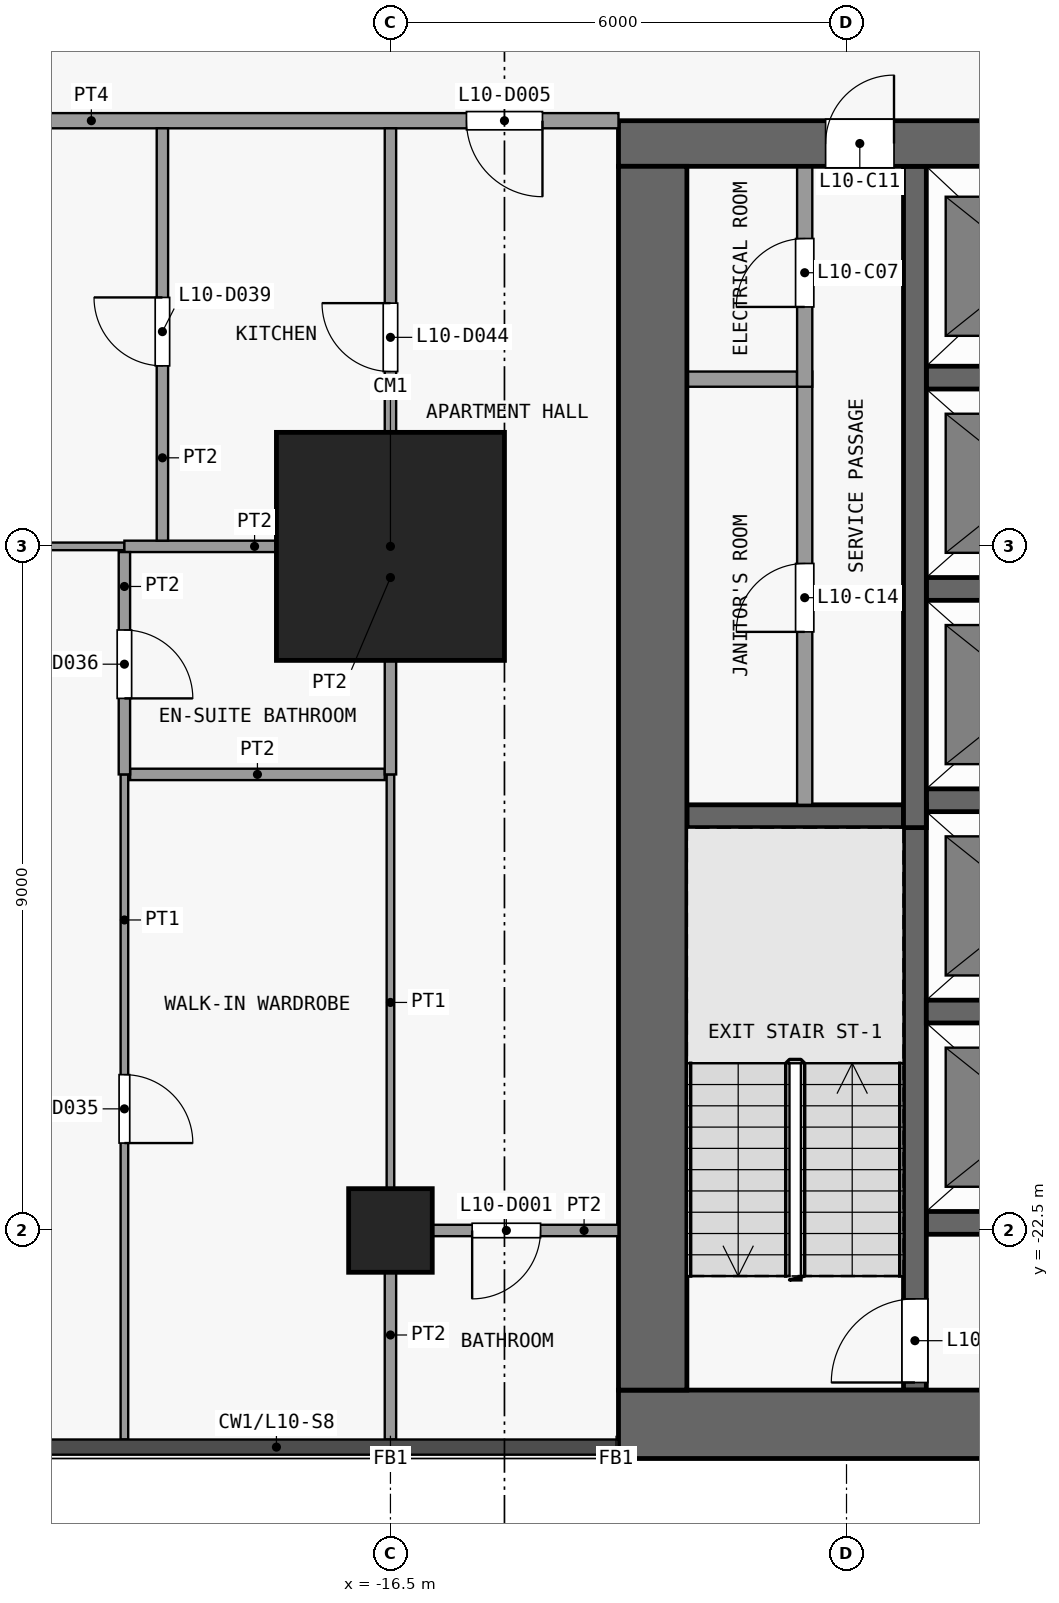
"""IFC4 building model, lengths in metres.
Left out: names, types, materials, properties, quantities, classifications, styles, units other than length and angle.
Written with IfcOpenShell. Run it as: python <this file> out.ifc"""

import sys

from ifc_helpers import new_model, si_unit, direction, frame, frame_2d, origin, origin_2d, place, context, subcontext, project, spatial, rectangle, extrude, element, fill, save


model = new_model("IFC4")
c1 = context("Model", 3, precision=1e-05, world=origin(), true_north=direction((0.0, 1.0)))
c2 = subcontext(c1, "Body", "Model", "MODEL_VIEW")
j1 = project(units=[si_unit("LENGTHUNIT", "METRE"), si_unit("PLANEANGLEUNIT", "RADIAN")], contexts=[c1])
p1 = place(None, origin())
s1 = spatial("IfcSite", under=j1, at=p1, CompositionType="ELEMENT")
p2 = place(p1, origin())
s2 = spatial("IfcBuilding", under=s1, at=p2, CompositionType="ELEMENT")
p3 = place(p2, frame((0.0, 0.0, 46.9)))
s3 = spatial("IfcBuildingStorey", under=s2, at=p3, CompositionType="ELEMENT", Elevation=46.9)
p4 = place(p3, frame((-16.5, -22.5, 0.0), z_axis=(0.0, 0.0, 1.0), x_axis=(1.0, 0.0, 0.0)))
e1 = element("IfcColumn", 1, at=p4, inside=s3, PredefinedType="COLUMN", context=c2, shape_type="SweptSolid", body=[
    extrude(rectangle(XDim=1.1, YDim=1.1, at=origin_2d()), origin(), (0.0, 0.0, 1.0), 3.6),
])
p5 = place(p3, frame((-16.5, -13.5, 0.0), z_axis=(0.0, 0.0, 1.0), x_axis=(1.0, 0.0, 0.0)))
e2 = element("IfcColumn", 2, at=p5, inside=s3, PredefinedType="COLUMN", context=c2, shape_type="SweptSolid", body=[
    extrude(rectangle(XDim=3.0, YDim=3.0, at=origin_2d()), origin(), (0.0, 0.0, 1.0), 3.6),
])
p6 = place(p3, frame((-13.5, -25.05, 0.0), z_axis=(0.0, 0.0, 1.0), x_axis=(1.0, 0.0, 0.0)))
e3 = element("IfcWall", 3, at=p6, inside=s3, PredefinedType="SHEAR", context=c2, shape_type="SweptSolid", body=[
    extrude(rectangle(XDim=27.0, YDim=0.9, at=frame_2d((13.5, 0.0))), origin(), (0.0, 0.0, 1.0), 3.3),
])
p7 = place(p3, frame((-13.5, -8.2, 0.0), z_axis=(0.0, 0.0, 1.0), x_axis=(1.0, 0.0, 0.0)))
e4 = element("IfcWall", 4, at=p7, inside=s3, PredefinedType="SHEAR", context=c2, shape_type="SweptSolid", body=[
    extrude(rectangle(XDim=27.0, YDim=0.6, at=frame_2d((13.5, 0.0))), origin(), (0.0, 0.0, 1.0), 3.3),
])
p8 = place(p7, frame((7.8, 0.0, 0.0)))
e5 = element("IfcOpeningElement", 5, at=p8, cuts=e4, PredefinedType="OPENING", context=c2, shape_type="SweptSolid", body=[
    extrude(rectangle(XDim=1.8, YDim=2.1, at=frame_2d((0.9, 1.05))), frame((0.0, 0.31, 0.0), z_axis=(0.0, -1.0, 0.0), x_axis=(1.0, 0.0, 0.0)), (0.0, 0.0, 1.0), 0.62),
])
p9 = place(p7, frame((17.4, 0.0, 0.0)))
e6 = element("IfcOpeningElement", 6, at=p9, cuts=e4, PredefinedType="OPENING", context=c2, shape_type="SweptSolid", body=[
    extrude(rectangle(XDim=1.8, YDim=2.1, at=frame_2d((0.9, 1.05))), frame((0.0, 0.31, 0.0), z_axis=(0.0, -1.0, 0.0), x_axis=(1.0, 0.0, 0.0)), (0.0, 0.0, 1.0), 0.62),
])
p10 = place(p7, frame((2.725, 0.0, 0.0)))
e7 = element("IfcOpeningElement", 7, at=p10, cuts=e4, PredefinedType="OPENING", context=c2, shape_type="SweptSolid", body=[
    extrude(rectangle(XDim=0.9, YDim=2.1, at=frame_2d((0.45, 1.05))), frame((0.0, 0.31, 0.0), z_axis=(0.0, -1.0, 0.0), x_axis=(1.0, 0.0, 0.0)), (0.0, 0.0, 1.0), 0.62),
])
p11 = place(p7, frame((23.375, 0.0, 0.0)))
e8 = element("IfcOpeningElement", 8, at=p11, cuts=e4, PredefinedType="OPENING", context=c2, shape_type="SweptSolid", body=[
    extrude(rectangle(XDim=0.9, YDim=2.1, at=frame_2d((0.45, 1.05))), frame((0.0, 0.31, 0.0), z_axis=(0.0, -1.0, 0.0), x_axis=(1.0, 0.0, 0.0)), (0.0, 0.0, 1.0), 0.62),
])
p12 = place(p3, frame((-13.05, -24.6, 0.0), z_axis=(0.0, 0.0, 1.0), x_axis=(0.0, 1.0, 0.0)))
e9 = element("IfcWall", 9, at=p12, inside=s3, PredefinedType="SHEAR", context=c2, shape_type="SweptSolid", body=[
    extrude(rectangle(XDim=16.1, YDim=0.9, at=frame_2d((8.05, 0.0))), origin(), (0.0, 0.0, 1.0), 3.3),
])
for number, where, z_axis, x_axis in (
    (10, (-9.45, -22.4, 0.0), (0.0, 0.0, 1.0), (1.0, 0.0, 0.0)),
    (11, (-9.45, -19.62, 0.0), (0.0, 0.0, 1.0), (1.0, 0.0, 0.0)),
):
    element("IfcWall", number, at=place(p3, frame(where, z_axis=z_axis, x_axis=x_axis)), inside=s3, PredefinedType="SHEAR", context=c2, shape_type="SweptSolid", body=[
        extrude(rectangle(XDim=2.8, YDim=0.3, at=frame_2d((1.4, 0.0))), origin(), (0.0, 0.0, 1.0), 3.3),
    ])
p13 = place(p3, frame((-12.6, -17.05, 0.0), z_axis=(0.0, 0.0, 1.0), x_axis=(1.0, 0.0, 0.0)))
e12 = element("IfcWall", 12, at=p13, inside=s3, PredefinedType="SHEAR", context=c2, shape_type="SweptSolid", body=[
    extrude(rectangle(XDim=2.85, YDim=0.3, at=frame_2d((1.425, 0.0))), origin(), (0.0, 0.0, 1.0), 3.3),
])
for number, where, z_axis, x_axis in (
    (13, (-9.45, -16.84, 0.0), (0.0, 0.0, 1.0), (1.0, 0.0, 0.0)),
    (14, (-9.45, -14.06, 0.0), (0.0, 0.0, 1.0), (1.0, 0.0, 0.0)),
):
    element("IfcWall", number, at=place(p3, frame(where, z_axis=z_axis, x_axis=x_axis)), inside=s3, PredefinedType="SHEAR", context=c2, shape_type="SweptSolid", body=[
        extrude(rectangle(XDim=2.8, YDim=0.3, at=frame_2d((1.4, 0.0))), origin(), (0.0, 0.0, 1.0), 3.3),
    ])
p14 = place(p3, frame((-12.6, -11.3, 0.0), z_axis=(0.0, 0.0, 1.0), x_axis=(1.0, 0.0, 0.0)))
e15 = element("IfcWall", 15, at=p14, inside=s3, PredefinedType="PARTITIONING", context=c2, shape_type="SweptSolid", body=[
    extrude(rectangle(XDim=1.45, YDim=0.2, at=frame_2d((0.725, 0.0))), origin(), (0.0, 0.0, 1.0), 3.3),
])
p15 = place(p3, frame((-9.45, -11.28, 0.0), z_axis=(0.0, 0.0, 1.0), x_axis=(1.0, 0.0, 0.0)))
e16 = element("IfcWall", 16, at=p15, inside=s3, PredefinedType="SHEAR", context=c2, shape_type="SweptSolid", body=[
    extrude(rectangle(XDim=2.8, YDim=0.3, at=frame_2d((1.4, 0.0))), origin(), (0.0, 0.0, 1.0), 3.3),
])
p16 = place(p3, frame((-11.05, -16.9, 0.0), z_axis=(0.0, 0.0, 1.0), x_axis=(0.0, 1.0, 0.0)))
e17 = element("IfcWall", 17, at=p16, inside=s3, PredefinedType="PARTITIONING", context=c2, shape_type="SweptSolid", body=[
    extrude(rectangle(XDim=5.7, YDim=0.2, at=frame_2d((2.85, 0.0))), origin(), (0.0, 0.0, 1.0), 3.3),
])
p17 = place(p16, frame((2.275, 0.0, 0.0)))
e18 = element("IfcOpeningElement", 18, at=p17, cuts=e17, PredefinedType="OPENING", context=c2, shape_type="SweptSolid", body=[
    extrude(rectangle(XDim=0.9, YDim=2.1, at=frame_2d((0.45, 1.05))), frame((0.0, 0.11, 0.0), z_axis=(0.0, -1.0, 0.0), x_axis=(1.0, 0.0, 0.0)), (0.0, 0.0, 1.0), 0.22),
])
p18 = place(p3, frame((-11.05, -11.4, 0.0), z_axis=(0.0, 0.0, 1.0), x_axis=(0.0, 1.0, 0.0)))
e19 = element("IfcWall", 19, at=p18, inside=s3, PredefinedType="PARTITIONING", context=c2, shape_type="SweptSolid", body=[
    extrude(rectangle(XDim=2.9, YDim=0.2, at=frame_2d((1.45, 0.0))), origin(), (0.0, 0.0, 1.0), 3.3),
])
p19 = place(p18, frame((1.05, 0.0, 0.0)))
e20 = element("IfcOpeningElement", 20, at=p19, cuts=e19, PredefinedType="OPENING", context=c2, shape_type="SweptSolid", body=[
    extrude(rectangle(XDim=0.9, YDim=2.1, at=frame_2d((0.45, 1.05))), frame((0.0, 0.11, 0.0), z_axis=(0.0, -1.0, 0.0), x_axis=(1.0, 0.0, 0.0)), (0.0, 0.0, 1.0), 0.22),
])
p20 = place(p3, frame((-9.6, -24.6, 0.0), z_axis=(0.0, 0.0, 1.0), x_axis=(0.0, 1.0, 0.0)))
e21 = element("IfcWall", 21, at=p20, inside=s3, PredefinedType="SHEAR", context=c2, shape_type="SweptSolid", body=[
    extrude(rectangle(XDim=7.7, YDim=0.3, at=frame_2d((3.85, 0.0))), origin(), (0.0, 0.0, 1.0), 3.3),
])
p21 = place(p20, frame((0.1, 0.0, 0.0)))
e22 = element("IfcOpeningElement", 22, at=p21, cuts=e21, PredefinedType="OPENING", context=c2, shape_type="SweptSolid", body=[
    extrude(rectangle(XDim=1.1, YDim=2.1, at=frame_2d((0.55, 1.05))), frame((0.0, 0.16, 0.0), z_axis=(0.0, -1.0, 0.0), x_axis=(1.0, 0.0, 0.0)), (0.0, 0.0, 1.0), 0.32),
])
p22 = place(p3, frame((-9.6, -17.2, 0.0), z_axis=(0.0, 0.0, 1.0), x_axis=(0.0, 1.0, 0.0)))
e23 = element("IfcWall", 23, at=p22, inside=s3, PredefinedType="SHEAR", context=c2, shape_type="SweptSolid", body=[
    extrude(rectangle(XDim=8.7, YDim=0.3, at=frame_2d((4.35, 0.0))), origin(), (0.0, 0.0, 1.0), 3.3),
])
p23 = place(p3, frame((-16.425, -22.5, 0.0), z_axis=(0.0, 0.0, 1.0), x_axis=(1.0, 0.0, 0.0)))
e24 = element("IfcWall", 24, at=p23, inside=s3, PredefinedType="PARTITIONING", context=c2, shape_type="SweptSolid", body=[
    extrude(rectangle(XDim=2.925, YDim=0.15, at=frame_2d((1.462, 0.0))), origin(), (0.0, 0.0, 1.0), 3.3),
])
p24 = place(p23, frame((1.0, 0.0, 0.0)))
e25 = element("IfcOpeningElement", 25, at=p24, cuts=e24, PredefinedType="OPENING", context=c2, shape_type="SweptSolid", body=[
    extrude(rectangle(XDim=0.9, YDim=2.1, at=frame_2d((0.45, 1.05))), frame((0.0, 0.085, 0.0), z_axis=(0.0, -1.0, 0.0), x_axis=(1.0, 0.0, 0.0)), (0.0, 0.0, 1.0), 0.17),
])
p25 = place(p3, frame((-19.925, -16.5, 0.0), z_axis=(0.0, 0.0, 1.0), x_axis=(1.0, 0.0, 0.0)))
e26 = element("IfcWall", 26, at=p25, inside=s3, PredefinedType="PARTITIONING", context=c2, shape_type="SweptSolid", body=[
    extrude(rectangle(XDim=3.35, YDim=0.15, at=frame_2d((1.675, 0.0))), origin(), (0.0, 0.0, 1.0), 3.3),
])
p26 = place(p3, frame((-25.25, -13.5, 0.0), z_axis=(0.0, 0.0, 1.0), x_axis=(1.0, 0.0, 0.0)))
e27 = element("IfcWall", 27, at=p26, inside=s3, PredefinedType="PARTITIONING", context=c2, shape_type="SweptSolid", body=[
    extrude(rectangle(XDim=5.25, YDim=0.1, at=frame_2d((2.625, 0.0))), origin(), (0.0, 0.0, 1.0), 3.3),
])
p27 = place(p26, frame((1.2, 0.0, 0.0)))
e28 = element("IfcOpeningElement", 28, at=p27, cuts=e27, PredefinedType="OPENING", context=c2, shape_type="SweptSolid", body=[
    extrude(rectangle(XDim=0.9, YDim=2.1, at=frame_2d((0.45, 1.05))), frame((0.0, 0.06, 0.0), z_axis=(0.0, -1.0, 0.0), x_axis=(1.0, 0.0, 0.0)), (0.0, 0.0, 1.0), 0.12),
])
p28 = place(p3, frame((-20.0, -13.5, 0.0), z_axis=(0.0, 0.0, 1.0), x_axis=(1.0, 0.0, 0.0)))
e29 = element("IfcWall", 29, at=p28, inside=s3, PredefinedType="PARTITIONING", context=c2, shape_type="SweptSolid", body=[
    extrude(rectangle(XDim=3.425, YDim=0.15, at=frame_2d((1.712, 0.0))), origin(), (0.0, 0.0, 1.0), 3.3),
])
p29 = place(p3, frame((-25.25, -7.9, 0.0), z_axis=(0.0, 0.0, 1.0), x_axis=(1.0, 0.0, 0.0)))
e30 = element("IfcWall", 30, at=p29, inside=s3, PredefinedType="PARTITIONING", context=c2, shape_type="SweptSolid", body=[
    extrude(rectangle(XDim=11.75, YDim=0.2, at=frame_2d((5.875, 0.0))), origin(), (0.0, 0.0, 1.0), 3.3),
])
p30 = place(p29, frame((9.75, 0.0, 0.0)))
e31 = element("IfcOpeningElement", 31, at=p30, cuts=e30, PredefinedType="OPENING", context=c2, shape_type="SweptSolid", body=[
    extrude(rectangle(XDim=1.0, YDim=2.1, at=frame_2d((0.5, 1.05))), frame((0.0, 0.11, 0.0), z_axis=(0.0, -1.0, 0.0), x_axis=(1.0, 0.0, 0.0)), (0.0, 0.0, 1.0), 0.22),
])
p31 = place(p3, frame((-20.0, -25.25, 0.0), z_axis=(0.0, 0.0, 1.0), x_axis=(0.0, 1.0, 0.0)))
e32 = element("IfcWall", 32, at=p31, inside=s3, PredefinedType="PARTITIONING", context=c2, shape_type="SweptSolid", body=[
    extrude(rectangle(XDim=8.75, YDim=0.1, at=frame_2d((4.375, 0.0))), origin(), (0.0, 0.0, 1.0), 3.3),
])
p32 = place(p31, frame((3.9, 0.0, 0.0)))
e33 = element("IfcOpeningElement", 33, at=p32, cuts=e32, PredefinedType="OPENING", context=c2, shape_type="SweptSolid", body=[
    extrude(rectangle(XDim=0.9, YDim=2.1, at=frame_2d((0.45, 1.05))), frame((0.0, 0.06, 0.0), z_axis=(0.0, -1.0, 0.0), x_axis=(1.0, 0.0, 0.0)), (0.0, 0.0, 1.0), 0.12),
])
p33 = place(p3, frame((-20.0, -16.5, 0.0), z_axis=(0.0, 0.0, 1.0), x_axis=(0.0, 1.0, 0.0)))
e34 = element("IfcWall", 34, at=p33, inside=s3, PredefinedType="PARTITIONING", context=c2, shape_type="SweptSolid", body=[
    extrude(rectangle(XDim=2.925, YDim=0.15, at=frame_2d((1.462, 0.0))), origin(), (0.0, 0.0, 1.0), 3.3),
])
p34 = place(p33, frame((1.0, 0.0, 0.0)))
e35 = element("IfcOpeningElement", 35, at=p34, cuts=e34, PredefinedType="OPENING", context=c2, shape_type="SweptSolid", body=[
    extrude(rectangle(XDim=0.9, YDim=2.1, at=frame_2d((0.45, 1.05))), frame((0.0, 0.085, 0.0), z_axis=(0.0, -1.0, 0.0), x_axis=(1.0, 0.0, 0.0)), (0.0, 0.0, 1.0), 0.17),
])
p35 = place(p3, frame((-19.5, -13.425, 0.0), z_axis=(0.0, 0.0, 1.0), x_axis=(0.0, 1.0, 0.0)))
e36 = element("IfcWall", 36, at=p35, inside=s3, PredefinedType="PARTITIONING", context=c2, shape_type="SweptSolid", body=[
    extrude(rectangle(XDim=5.425, YDim=0.15, at=frame_2d((2.712, 0.0))), origin(), (0.0, 0.0, 1.0), 3.3),
])
p36 = place(p35, frame((2.3, 0.0, 0.0)))
e37 = element("IfcOpeningElement", 37, at=p36, cuts=e36, PredefinedType="OPENING", context=c2, shape_type="SweptSolid", body=[
    extrude(rectangle(XDim=0.9, YDim=2.1, at=frame_2d((0.45, 1.05))), frame((0.0, 0.085, 0.0), z_axis=(0.0, -1.0, 0.0), x_axis=(1.0, 0.0, 0.0)), (0.0, 0.0, 1.0), 0.17),
])
p37 = place(p3, frame((-16.5, -22.5, 0.0), z_axis=(0.0, 0.0, 1.0), x_axis=(0.0, 1.0, 0.0)))
e38 = element("IfcWall", 38, at=p37, inside=s3, PredefinedType="PARTITIONING", context=c2, shape_type="SweptSolid", body=[
    extrude(rectangle(XDim=6.0, YDim=0.1, at=frame_2d((3.0, 0.0))), origin(), (0.0, 0.0, 1.0), 3.3),
])
p38 = place(p3, frame((-16.5, -25.25, 0.0), z_axis=(0.0, 0.0, 1.0), x_axis=(0.0, 1.0, 0.0)))
e39 = element("IfcWall", 39, at=p38, inside=s3, PredefinedType="PARTITIONING", context=c2, shape_type="SweptSolid", body=[
    extrude(rectangle(XDim=2.75, YDim=0.15, at=frame_2d((1.375, 0.0))), origin(), (0.0, 0.0, 1.0), 3.3),
])
p39 = place(p3, frame((-16.5, -16.5, 0.0), z_axis=(0.0, 0.0, 1.0), x_axis=(0.0, 1.0, 0.0)))
e40 = element("IfcWall", 40, at=p39, inside=s3, PredefinedType="PARTITIONING", context=c2, shape_type="SweptSolid", body=[
    extrude(rectangle(XDim=8.5, YDim=0.15, at=frame_2d((4.25, 0.0))), origin(), (0.0, 0.0, 1.0), 3.3),
])
p40 = place(p39, frame((5.3, 0.0, 0.0)))
e41 = element("IfcOpeningElement", 41, at=p40, cuts=e40, PredefinedType="OPENING", context=c2, shape_type="SweptSolid", body=[
    extrude(rectangle(XDim=0.9, YDim=2.1, at=frame_2d((0.45, 1.05))), frame((0.0, 0.085, 0.0), z_axis=(0.0, -1.0, 0.0), x_axis=(1.0, 0.0, 0.0)), (0.0, 0.0, 1.0), 0.17),
])
p41 = place(p19, origin())
e42 = element("IfcDoor", 42, at=p41, inside=s3, OperationType="SINGLE_SWING_LEFT", PredefinedType="DOOR", context=c2, shape_type="SweptSolid", body=[
    extrude(rectangle(XDim=0.9, YDim=2.1, at=frame_2d((0.45, 1.05))), frame((0.0, 0.025, 0.0), z_axis=(0.0, -1.0, 0.0), x_axis=(1.0, 0.0, 0.0)), (0.0, 0.0, 1.0), 0.05),
])
fill(e20, e42)
p42 = place(p10, origin())
e43 = element("IfcDoor", 43, at=p42, inside=s3, OperationType="SINGLE_SWING_RIGHT", PredefinedType="DOOR", context=c2, shape_type="SweptSolid", body=[
    extrude(rectangle(XDim=0.9, YDim=2.1, at=frame_2d((0.45, 1.05))), frame((0.0, 0.025, 0.0), z_axis=(0.0, -1.0, 0.0), x_axis=(1.0, 0.0, 0.0)), (0.0, 0.0, 1.0), 0.05),
])
fill(e7, e43)
p43 = place(p17, origin())
e44 = element("IfcDoor", 44, at=p43, inside=s3, OperationType="SINGLE_SWING_LEFT", PredefinedType="DOOR", context=c2, shape_type="SweptSolid", body=[
    extrude(rectangle(XDim=0.9, YDim=2.1, at=frame_2d((0.45, 1.05))), frame((0.0, 0.025, 0.0), z_axis=(0.0, -1.0, 0.0), x_axis=(1.0, 0.0, 0.0)), (0.0, 0.0, 1.0), 0.05),
])
fill(e18, e44)
p44 = place(p21, origin())
e45 = element("IfcDoor", 45, at=p44, inside=s3, OperationType="SINGLE_SWING_LEFT", PredefinedType="DOOR", context=c2, shape_type="SweptSolid", body=[
    extrude(rectangle(XDim=1.1, YDim=2.1, at=frame_2d((0.55, 1.05))), frame((0.0, 0.025, 0.0), z_axis=(0.0, -1.0, 0.0), x_axis=(1.0, 0.0, 0.0)), (0.0, 0.0, 1.0), 0.05),
])
fill(e22, e45)
p45 = place(p24, origin())
e46 = element("IfcDoor", 46, at=p45, inside=s3, OperationType="SINGLE_SWING_LEFT", PredefinedType="DOOR", context=c2, shape_type="SweptSolid", body=[
    extrude(rectangle(XDim=0.9, YDim=2.1, at=frame_2d((0.45, 1.05))), frame((0.0, 0.025, 0.0), z_axis=(0.0, -1.0, 0.0), x_axis=(1.0, 0.0, 0.0)), (0.0, 0.0, 1.0), 0.05),
])
fill(e25, e46)
p46 = place(p30, origin())
e47 = element("IfcDoor", 47, at=p46, inside=s3, OperationType="SINGLE_SWING_RIGHT", PredefinedType="DOOR", context=c2, shape_type="SweptSolid", body=[
    extrude(rectangle(XDim=1.0, YDim=2.1, at=frame_2d((0.5, 1.05))), frame((0.0, 0.025, 0.0), z_axis=(0.0, -1.0, 0.0), x_axis=(1.0, 0.0, 0.0)), (0.0, 0.0, 1.0), 0.05),
])
fill(e31, e47)
p47 = place(p32, origin())
e48 = element("IfcDoor", 48, at=p47, inside=s3, OperationType="SINGLE_SWING_LEFT", PredefinedType="DOOR", context=c2, shape_type="SweptSolid", body=[
    extrude(rectangle(XDim=0.9, YDim=2.1, at=frame_2d((0.45, 1.05))), frame((0.0, 0.025, 0.0), z_axis=(0.0, -1.0, 0.0), x_axis=(1.0, 0.0, 0.0)), (0.0, 0.0, 1.0), 0.05),
])
fill(e33, e48)
p48 = place(p34, origin())
e49 = element("IfcDoor", 49, at=p48, inside=s3, OperationType="SINGLE_SWING_LEFT", PredefinedType="DOOR", context=c2, shape_type="SweptSolid", body=[
    extrude(rectangle(XDim=0.9, YDim=2.1, at=frame_2d((0.45, 1.05))), frame((0.0, 0.025, 0.0), z_axis=(0.0, -1.0, 0.0), x_axis=(1.0, 0.0, 0.0)), (0.0, 0.0, 1.0), 0.05),
])
fill(e35, e49)
p49 = place(p36, origin())
e50 = element("IfcDoor", 50, at=p49, inside=s3, OperationType="SINGLE_SWING_LEFT", PredefinedType="DOOR", context=c2, shape_type="SweptSolid", body=[
    extrude(rectangle(XDim=0.9, YDim=2.1, at=frame_2d((0.45, 1.05))), frame((0.0, 0.025, 0.0), z_axis=(0.0, -1.0, 0.0), x_axis=(1.0, 0.0, 0.0)), (0.0, 0.0, 1.0), 0.05),
])
fill(e37, e50)
p50 = place(p40, origin())
e51 = element("IfcDoor", 51, at=p50, inside=s3, OperationType="SINGLE_SWING_LEFT", PredefinedType="DOOR", context=c2, shape_type="SweptSolid", body=[
    extrude(rectangle(XDim=0.9, YDim=2.1, at=frame_2d((0.45, 1.05))), frame((0.0, 0.025, 0.0), z_axis=(0.0, -1.0, 0.0), x_axis=(1.0, 0.0, 0.0)), (0.0, 0.0, 1.0), 0.05),
])
fill(e41, e51)
save(model, sys.argv[1])
